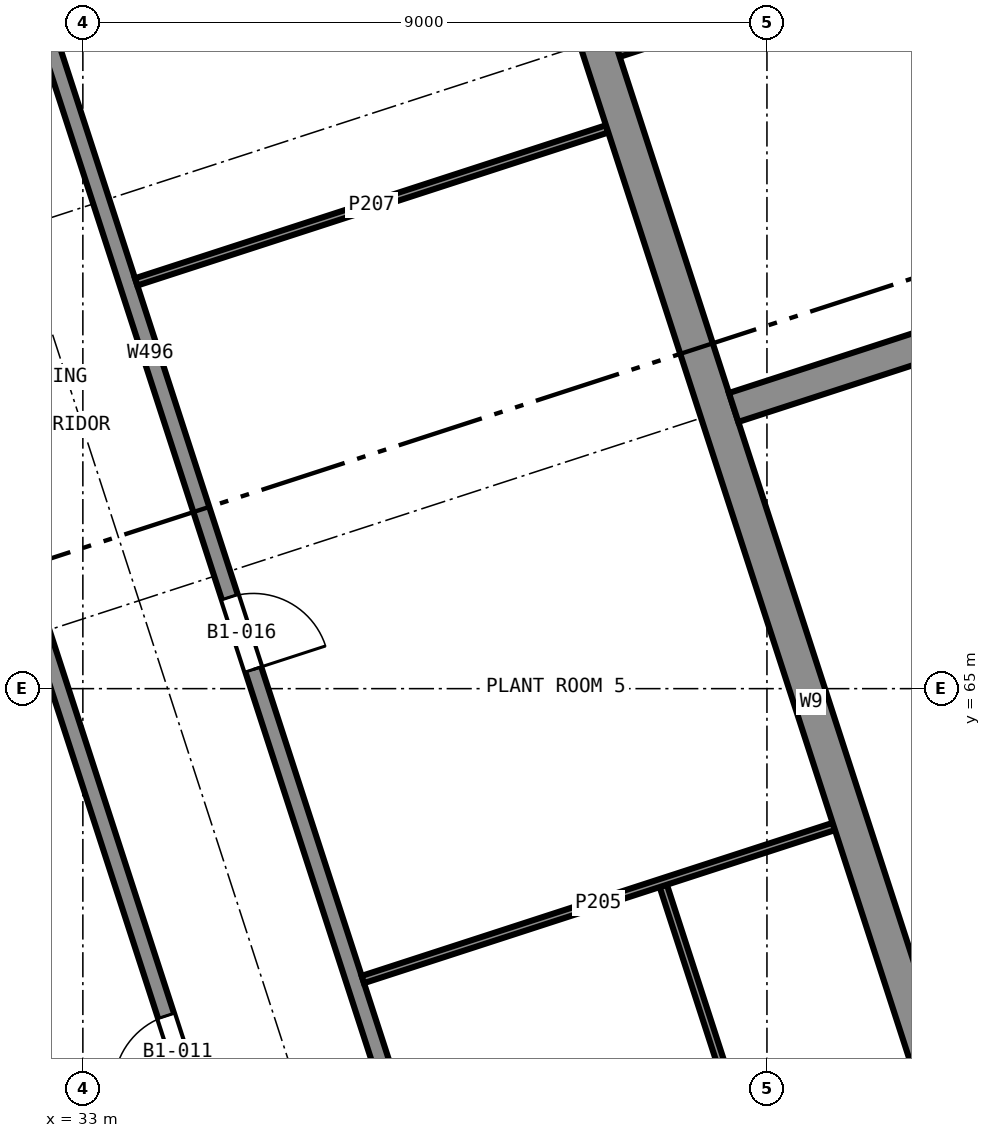
"""IFC4 building model, lengths in metres.
Left out: names, types, materials, properties, quantities, classifications, styles, units other than length and angle.
Written with IfcOpenShell. Run it as: python <this file> out.ifc"""

import sys

from ifc_helpers import new_model, si_unit, direction, frame, frame_2d, origin, place, context, subcontext, project, spatial, rectangle, extrude, element, fill, save


model = new_model("IFC4")
c1 = context("Model", 3, precision=1e-05, world=origin(), true_north=direction((0.0, 1.0)))
c2 = subcontext(c1, "Body", "Model", "MODEL_VIEW")
j1 = project(units=[si_unit("LENGTHUNIT", "METRE"), si_unit("PLANEANGLEUNIT", "RADIAN")], contexts=[c1])
p1 = place(None, origin())
s1 = spatial("IfcSite", under=j1, at=p1, CompositionType="ELEMENT")
p2 = place(p1, origin())
s2 = spatial("IfcBuilding", under=s1, at=p2, CompositionType="ELEMENT")
p3 = place(p2, frame((0.0, 0.0, -5.0)))
s3 = spatial("IfcBuildingStorey", under=s2, at=p3, CompositionType="ELEMENT", Elevation=-5.0)
p4 = place(p3, frame((49.93, 42.214, 0.0), z_axis=(0.0, 0.0, 1.0), x_axis=(-0.309013046462, 0.951057799041, 0.0)))
e1 = element("IfcWall", 1, at=p4, inside=s3, PredefinedType="SHEAR", context=c2, shape_type="SweptSolid", body=[
    extrude(rectangle(XDim=47.55, YDim=0.45, at=frame_2d((23.775, 0.0))), origin(), (0.0, 0.0, 1.0), 5.0),
])
p5 = place(p4, frame((11.775, 0.0, 0.0)))
e2 = element("IfcOpeningElement", 2, at=p5, cuts=e1, PredefinedType="OPENING", context=c2, shape_type="SweptSolid", body=[
    extrude(rectangle(XDim=1.2, YDim=2.1, at=frame_2d((0.6, 1.05))), frame((0.0, 0.235, 0.0), z_axis=(0.0, -1.0, 0.0), x_axis=(1.0, 0.0, 0.0)), (0.0, 0.0, 1.0), 0.47),
])
p6 = place(p4, frame((44.175, 0.0, 0.0)))
e3 = element("IfcOpeningElement", 3, at=p6, cuts=e1, PredefinedType="OPENING", context=c2, shape_type="SweptSolid", body=[
    extrude(rectangle(XDim=1.2, YDim=2.1, at=frame_2d((0.6, 1.05))), frame((0.0, 0.235, 0.0), z_axis=(0.0, -1.0, 0.0), x_axis=(1.0, 0.0, 0.0)), (0.0, 0.0, 1.0), 0.47),
])
p7 = place(p3, frame((41.562, 68.699, 0.0), z_axis=(0.0, 0.0, 1.0), x_axis=(0.951058008754, 0.309012401021, 0.0)))
e4 = element("IfcWall", 4, at=p7, inside=s3, PredefinedType="SHEAR", context=c2, shape_type="SweptSolid", body=[
    extrude(rectangle(XDim=28.55, YDim=0.4, at=frame_2d((14.275, 0.0))), origin(), (0.0, 0.0, 1.0), 5.0),
])
p8 = place(p3, frame((33.438, 41.035, 0.0), z_axis=(0.0, 0.0, 1.0), x_axis=(-0.309020156104, 0.951055488981, 0.0)))
e5 = element("IfcWall", 5, at=p8, inside=s3, PredefinedType="SOLIDWALL", context=c2, shape_type="SweptSolid", body=[
    extrude(rectangle(XDim=53.6, YDim=0.4, at=frame_2d((26.8, 0.0))), origin(), (0.0, 0.0, 1.0), 5.0),
])
p9 = place(p3, frame((40.016, 73.454, 0.0), z_axis=(0.0, 0.0, 1.0), x_axis=(0.951051963279, 0.309031006768, 0.0)))
e6 = element("IfcWall", 6, at=p9, inside=s3, PredefinedType="SOLIDWALL", context=c2, shape_type="SweptSolid", body=[
    extrude(rectangle(XDim=9.925, YDim=0.3, at=frame_2d((4.962, 0.0))), origin(), (0.0, 0.0, 1.0), 4.6),
])
p10 = place(p3, frame((37.956, 48.812, 0.0), z_axis=(0.0, 0.0, 1.0), x_axis=(-0.30901736393, 0.951056396219, 0.0)))
e7 = element("IfcWall", 7, at=p10, inside=s3, PredefinedType="SOLIDWALL", context=c2, shape_type="SweptSolid", body=[
    extrude(rectangle(XDim=41.7, YDim=0.22, at=frame_2d((20.85, 0.0))), origin(), (0.0, 0.0, 1.0), 4.6),
])
p11 = place(p10, frame((2.009, 0.0, 0.0)))
e8 = element("IfcOpeningElement", 8, at=p11, cuts=e7, PredefinedType="OPENING", context=c2, shape_type="SweptSolid", body=[
    extrude(rectangle(XDim=1.0, YDim=2.1, at=frame_2d((0.5, 1.05))), frame((0.0, 0.12, 0.0), z_axis=(0.0, -1.0, 0.0), x_axis=(1.0, 0.0, 0.0)), (0.0, 0.0, 1.0), 0.24),
])
p12 = place(p10, frame((11.495, 0.0, 0.0)))
e9 = element("IfcOpeningElement", 9, at=p12, cuts=e7, PredefinedType="OPENING", context=c2, shape_type="SweptSolid", body=[
    extrude(rectangle(XDim=1.0, YDim=2.1, at=frame_2d((0.5, 1.05))), frame((0.0, 0.12, 0.0), z_axis=(0.0, -1.0, 0.0), x_axis=(1.0, 0.0, 0.0)), (0.0, 0.0, 1.0), 0.24),
])
p13 = place(p10, frame((24.3, 0.0, 0.0)))
e10 = element("IfcOpeningElement", 10, at=p13, cuts=e7, PredefinedType="OPENING", context=c2, shape_type="SweptSolid", body=[
    extrude(rectangle(XDim=1.0, YDim=2.1, at=frame_2d((0.5, 1.05))), frame((0.0, 0.12, 0.0), z_axis=(0.0, -1.0, 0.0), x_axis=(1.0, 0.0, 0.0)), (0.0, 0.0, 1.0), 0.24),
])
p14 = place(p10, frame((35.045, 0.0, 0.0)))
e11 = element("IfcOpeningElement", 11, at=p14, cuts=e7, PredefinedType="OPENING", context=c2, shape_type="SweptSolid", body=[
    extrude(rectangle(XDim=1.0, YDim=2.1, at=frame_2d((0.5, 1.05))), frame((0.0, 0.12, 0.0), z_axis=(0.0, -1.0, 0.0), x_axis=(1.0, 0.0, 0.0)), (0.0, 0.0, 1.0), 0.24),
])
p15 = place(p3, frame((40.333, 49.584, 0.0), z_axis=(0.0, 0.0, 1.0), x_axis=(-0.309015643281, 0.951056955291, 0.0)))
e12 = element("IfcWall", 12, at=p15, inside=s3, PredefinedType="SOLIDWALL", context=c2, shape_type="SweptSolid", body=[
    extrude(rectangle(XDim=41.7, YDim=0.22, at=frame_2d((20.85, 0.0))), origin(), (0.0, 0.0, 1.0), 4.6),
])
p16 = place(p15, frame((2.0, 0.0, 0.0)))
e13 = element("IfcOpeningElement", 13, at=p16, cuts=e12, PredefinedType="OPENING", context=c2, shape_type="SweptSolid", body=[
    extrude(rectangle(XDim=1.0, YDim=2.1, at=frame_2d((0.5, 1.05))), frame((0.0, 0.12, 0.0), z_axis=(0.0, -1.0, 0.0), x_axis=(1.0, 0.0, 0.0)), (0.0, 0.0, 1.0), 0.24),
])
p17 = place(p15, frame((8.285, 0.0, 0.0)))
e14 = element("IfcOpeningElement", 14, at=p17, cuts=e12, PredefinedType="OPENING", context=c2, shape_type="SweptSolid", body=[
    extrude(rectangle(XDim=1.0, YDim=2.1, at=frame_2d((0.5, 1.05))), frame((0.0, 0.12, 0.0), z_axis=(0.0, -1.0, 0.0), x_axis=(1.0, 0.0, 0.0)), (0.0, 0.0, 1.0), 0.24),
])
p18 = place(p15, frame((16.475, 0.0, 0.0)))
e15 = element("IfcOpeningElement", 15, at=p18, cuts=e12, PredefinedType="OPENING", context=c2, shape_type="SweptSolid", body=[
    extrude(rectangle(XDim=1.0, YDim=2.1, at=frame_2d((0.5, 1.05))), frame((0.0, 0.12, 0.0), z_axis=(0.0, -1.0, 0.0), x_axis=(1.0, 0.0, 0.0)), (0.0, 0.0, 1.0), 0.24),
])
p19 = place(p15, frame((25.752, 0.0, 0.0)))
e16 = element("IfcOpeningElement", 16, at=p19, cuts=e12, PredefinedType="OPENING", context=c2, shape_type="SweptSolid", body=[
    extrude(rectangle(XDim=1.0, YDim=2.1, at=frame_2d((0.5, 1.05))), frame((0.0, 0.12, 0.0), z_axis=(0.0, -1.0, 0.0), x_axis=(1.0, 0.0, 0.0)), (0.0, 0.0, 1.0), 0.24),
])
p20 = place(p15, frame((32.761, 0.0, 0.0)))
e17 = element("IfcOpeningElement", 17, at=p20, cuts=e12, PredefinedType="OPENING", context=c2, shape_type="SweptSolid", body=[
    extrude(rectangle(XDim=1.0, YDim=2.1, at=frame_2d((0.5, 1.05))), frame((0.0, 0.12, 0.0), z_axis=(0.0, -1.0, 0.0), x_axis=(1.0, 0.0, 0.0)), (0.0, 0.0, 1.0), 0.24),
])
for number, where, z_axis, x_axis in (
    (18, (36.683, 61.173, 0.0), (0.0, 0.0, 1.0), (0.951, 0.309, 0.0)),
    (19, (33.701, 70.351, 0.0), (0.0, 0.0, 1.0), (0.951, 0.309, 0.0)),
):
    element("IfcWall", number, at=place(p3, frame(where, z_axis=z_axis, x_axis=x_axis)), inside=s3, PredefinedType="PARTITIONING", context=c2, shape_type="SweptSolid", body=[
        extrude(rectangle(XDim=6.515, YDim=0.1, at=frame_2d((3.257, 0.0))), origin(), (0.0, 0.0, 1.0), 4.6),
    ])
p21 = place(p3, frame((42.815, 55.7, 0.0), z_axis=(0.0, 0.0, 1.0), x_axis=(-0.309008548956, 0.951059260337, 0.0)))
e20 = element("IfcWall", 20, at=p21, inside=s3, PredefinedType="PARTITIONING", context=c2, shape_type="SweptSolid", body=[
    extrude(rectangle(XDim=7.05, YDim=0.1, at=frame_2d((3.525, 0.0))), origin(), (0.0, 0.0, 1.0), 4.6),
])
p22 = place(p12, origin())
e21 = element("IfcDoor", 21, at=p22, inside=s3, OperationType="SINGLE_SWING_RIGHT", PredefinedType="DOOR", context=c2, shape_type="SweptSolid", body=[
    extrude(rectangle(XDim=1.0, YDim=2.1, at=frame_2d((0.5, 1.05))), frame((0.0, 0.025, 0.0), z_axis=(0.0, -1.0, 0.0), x_axis=(1.0, 0.0, 0.0)), (0.0, 0.0, 1.0), 0.05),
])
fill(e9, e21)
p23 = place(p18, frame((1.0, 0.0, 0.0), z_axis=(0.0, 0.0, 1.0), x_axis=(-1.0, 0.0, 0.0)))
e22 = element("IfcDoor", 22, at=p23, inside=s3, OperationType="SINGLE_SWING_LEFT", PredefinedType="DOOR", context=c2, shape_type="SweptSolid", body=[
    extrude(rectangle(XDim=1.0, YDim=2.1, at=frame_2d((0.5, 1.05))), frame((0.0, 0.025, 0.0), z_axis=(0.0, -1.0, 0.0), x_axis=(1.0, 0.0, 0.0)), (0.0, 0.0, 1.0), 0.05),
])
fill(e15, e22)
save(model, sys.argv[1])
